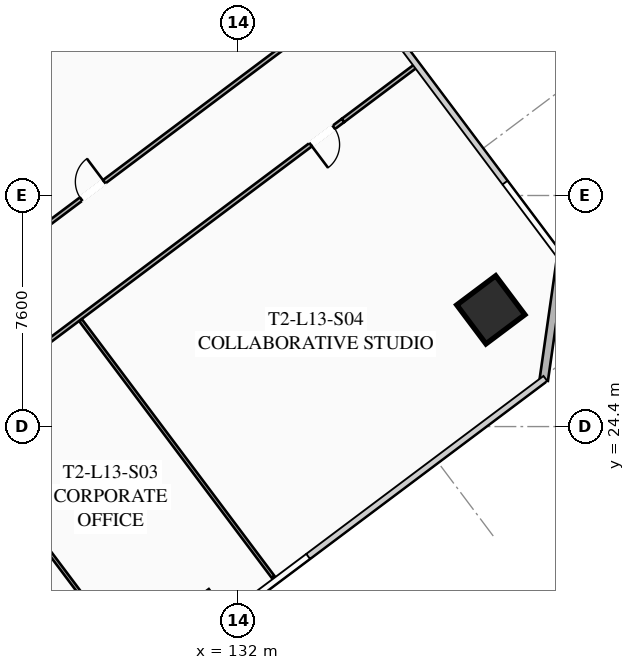
"""IFC4 building model, lengths in metres.
Left out: names, types, materials, properties, quantities, classifications, styles, units other than length and angle.
Written with IfcOpenShell. Run it as: python <this file> out.ifc"""

import sys

from ifc_helpers import new_model, si_unit, direction, frame, frame_2d, origin, origin_2d, place, context, subcontext, project, spatial, rectangle, hollow_rectangle, extrude, element, fill, save


model = new_model("IFC4")
c1 = context("Model", 3, precision=1e-05, world=origin(), true_north=direction((0.0, 1.0)))
c2 = subcontext(c1, "Body", "Model", "MODEL_VIEW")
j1 = project(units=[si_unit("LENGTHUNIT", "METRE"), si_unit("PLANEANGLEUNIT", "RADIAN")], contexts=[c1])
p1 = place(None, origin())
s1 = spatial("IfcSite", under=j1, at=p1, CompositionType="ELEMENT")
p2 = place(p1, origin())
s2 = spatial("IfcBuilding", under=s1, at=p2, CompositionType="ELEMENT")
p3 = place(p2, frame((0.0, 0.0, 53.0)))
s3 = spatial("IfcBuildingStorey", under=s2, at=p3, CompositionType="ELEMENT", Elevation=53.0)
p4 = place(p3, frame((140.32, 28.24, 0.0), z_axis=(0.0, 0.0, 1.0), x_axis=(0.799999996291, 0.600000004945, 0.0)))
e1 = element("IfcColumn", 1, at=p4, inside=s3, PredefinedType="COLUMN", context=c2, shape_type="SweptSolid", body=[
    extrude(hollow_rectangle(XDim=1.6, YDim=1.6, WallThickness=0.06, at=origin_2d()), origin(), (0.0, 0.0, 1.0), 3.35),
])
p5 = place(p3, frame((142.64, 29.98, 0.0), z_axis=(0.0, 0.0, 1.0), x_axis=(-0.14137968631, -0.989955445613, 0.0)))
e2 = element("IfcWall", 2, at=p5, inside=s3, PredefinedType="SOLIDWALL", context=c2, shape_type="SweptSolid", body=[
    extrude(rectangle(XDim=4.101, YDim=0.28, at=frame_2d((2.051, 0.0))), origin(), (0.0, 0.0, 1.0), 3.35),
])
p6 = place(p3, frame((135.46, 34.47, 0.0), z_axis=(0.0, 0.0, 1.0), x_axis=(-0.800001944698, -0.59999740706, 0.0)))
e3 = element("IfcWall", 3, at=p6, inside=s3, PredefinedType="PARTITIONING", context=c2, shape_type="SweptSolid", body=[
    extrude(rectangle(XDim=30.13, YDim=0.135, at=frame_2d((15.065, 0.0))), origin(), (0.0, 0.0, 1.0), 2.703),
])
p7 = place(p6, frame((28.8, 0.0, 0.0)))
e4 = element("IfcOpeningElement", 4, at=p7, cuts=e3, PredefinedType="OPENING", context=c2, shape_type="SweptSolid", body=[
    extrude(rectangle(XDim=0.95, YDim=2.05, at=frame_2d((0.475, 1.025))), frame((0.0, 0.077, 0.0), z_axis=(0.0, -1.0, 0.0), x_axis=(1.0, 0.0, 0.0)), (0.0, 0.0, 1.0), 0.155),
])
p8 = place(p6, frame((17.921, 0.0, 0.0)))
e5 = element("IfcOpeningElement", 5, at=p8, cuts=e3, PredefinedType="OPENING", context=c2, shape_type="SweptSolid", body=[
    extrude(rectangle(XDim=0.95, YDim=2.05, at=frame_2d((0.475, 1.025))), frame((0.0, 0.077, 0.0), z_axis=(0.0, -1.0, 0.0), x_axis=(1.0, 0.0, 0.0)), (0.0, 0.0, 1.0), 0.155),
])
p9 = place(p6, frame((14.129, 0.0, 0.0)))
e6 = element("IfcOpeningElement", 6, at=p9, cuts=e3, PredefinedType="OPENING", context=c2, shape_type="SweptSolid", body=[
    extrude(rectangle(XDim=0.95, YDim=2.05, at=frame_2d((0.475, 1.025))), frame((0.0, 0.077, 0.0), z_axis=(0.0, -1.0, 0.0), x_axis=(1.0, 0.0, 0.0)), (0.0, 0.0, 1.0), 0.155),
])
p10 = place(p6, frame((0.38, 0.0, 0.0)))
e7 = element("IfcOpeningElement", 7, at=p10, cuts=e3, PredefinedType="OPENING", context=c2, shape_type="SweptSolid", body=[
    extrude(rectangle(XDim=0.95, YDim=2.05, at=frame_2d((0.475, 1.025))), frame((0.0, 0.077, 0.0), z_axis=(0.0, -1.0, 0.0), x_axis=(1.0, 0.0, 0.0)), (0.0, 0.0, 1.0), 0.155),
])
p11 = place(p3, frame((135.46, 34.47, 0.0), z_axis=(0.0, 0.0, 1.0), x_axis=(0.799990331366, 0.600012891296, 0.0)))
e8 = element("IfcWall", 8, at=p11, inside=s3, PredefinedType="PARTITIONING", context=c2, shape_type="SweptSolid", body=[
    extrude(rectangle(XDim=3.03, YDim=0.135, at=frame_2d((1.515, 0.0))), origin(), (0.0, 0.0, 1.0), 2.703),
])
p12 = place(p3, frame((128.838, 16.216, 0.0), z_axis=(0.0, 0.0, 1.0), x_axis=(-0.599992594658, 0.800005553953, 0.0)))
e9 = element("IfcWall", 9, at=p12, inside=s3, PredefinedType="PARTITIONING", context=c2, shape_type="SweptSolid", body=[
    extrude(rectangle(XDim=10.55, YDim=0.11, at=frame_2d((5.275, 0.0))), origin(), (0.0, 0.0, 1.0), 2.703),
])
p13 = place(p3, frame((133.158, 19.456, 0.0), z_axis=(0.0, 0.0, 1.0), x_axis=(-0.600007405188, 0.799994446056, 0.0)))
e10 = element("IfcWall", 10, at=p13, inside=s3, PredefinedType="PARTITIONING", context=c2, shape_type="SweptSolid", body=[
    extrude(rectangle(XDim=10.55, YDim=0.11, at=frame_2d((5.275, 0.0))), origin(), (0.0, 0.0, 1.0), 2.703),
])
p14 = place(p3, frame((125.208, 30.656, 0.0), z_axis=(0.0, 0.0, 1.0), x_axis=(0.799995666112, 0.600005778473, 0.0)))
e11 = element("IfcWall", 11, at=p14, inside=s3, PredefinedType="PARTITIONING", context=c2, shape_type="SweptSolid", body=[
    extrude(rectangle(XDim=13.52, YDim=0.135, at=frame_2d((6.76, 0.0))), origin(), (0.0, 0.0, 1.0), 2.703),
])
p15 = place(p14, frame((2.045, 0.0, 0.0)))
e12 = element("IfcOpeningElement", 12, at=p15, cuts=e11, PredefinedType="OPENING", context=c2, shape_type="SweptSolid", body=[
    extrude(rectangle(XDim=0.95, YDim=2.05, at=frame_2d((0.475, 1.025))), frame((0.0, 0.077, 0.0), z_axis=(0.0, -1.0, 0.0), x_axis=(1.0, 0.0, 0.0)), (0.0, 0.0, 1.0), 0.155),
])
p16 = place(p10, origin())
e13 = element("IfcDoor", 13, at=p16, inside=s3, OperationType="SINGLE_SWING_RIGHT", PredefinedType="DOOR", context=c2, shape_type="SweptSolid", body=[
    extrude(rectangle(XDim=0.95, YDim=2.05, at=frame_2d((0.475, 1.025))), frame((0.0, 0.025, 0.0), z_axis=(0.0, -1.0, 0.0), x_axis=(1.0, 0.0, 0.0)), (0.0, 0.0, 1.0), 0.05),
])
fill(e7, e13)
p17 = place(p15, origin())
e14 = element("IfcDoor", 14, at=p17, inside=s3, OperationType="SINGLE_SWING_RIGHT", PredefinedType="DOOR", context=c2, shape_type="SweptSolid", body=[
    extrude(rectangle(XDim=0.95, YDim=2.05, at=frame_2d((0.475, 1.025))), frame((0.0, 0.025, 0.0), z_axis=(0.0, -1.0, 0.0), x_axis=(1.0, 0.0, 0.0)), (0.0, 0.0, 1.0), 0.05),
])
fill(e12, e14)
save(model, sys.argv[1])
